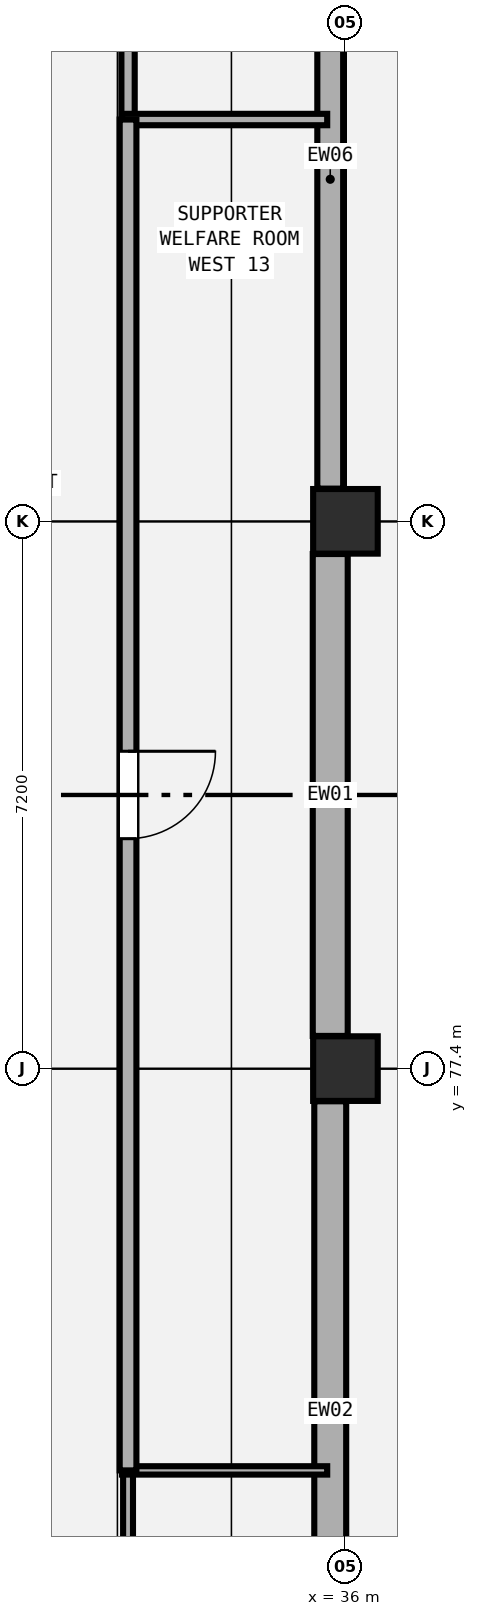
"""IFC4 building model, lengths in metres.
Left out: names, types, materials, properties, quantities, classifications, styles, units other than length and angle.
Written with IfcOpenShell. Run it as: python <this file> out.ifc"""

import sys

from ifc_helpers import new_model, si_unit, direction, frame, frame_2d, origin, origin_2d, place, context, subcontext, project, spatial, rectangle, extrude, element, fill, save


model = new_model("IFC4")
c1 = context("Model", 3, precision=1e-05, world=origin(), true_north=direction((0.0, 1.0)))
c2 = subcontext(c1, "Body", "Model", "MODEL_VIEW")
j1 = project(units=[si_unit("LENGTHUNIT", "METRE"), si_unit("PLANEANGLEUNIT", "RADIAN")], contexts=[c1])
p1 = place(None, origin())
s1 = spatial("IfcSite", under=j1, at=p1, CompositionType="ELEMENT")
p2 = place(p1, origin())
s2 = spatial("IfcBuilding", under=s1, at=p2, CompositionType="ELEMENT")
p3 = place(p2, frame((0.0, 0.0, 19.2)))
s3 = spatial("IfcBuildingStorey", under=s2, at=p3, CompositionType="ELEMENT", Elevation=19.2)
for number, where, z_axis, x_axis in (
    (1, (36.0, 77.4, 0.0), (0.0, 0.0, 1.0), (1.0, 0.0, 0.0)),
    (2, (36.0, 84.6, 0.0), (0.0, 0.0, 1.0), (1.0, 0.0, 0.0)),
):
    element("IfcColumn", number, at=place(p3, frame(where, z_axis=z_axis, x_axis=x_axis)), inside=s3, PredefinedType="COLUMN", context=c2, shape_type="SweptSolid", body=[
        extrude(rectangle(XDim=0.85, YDim=0.85, at=origin_2d()), origin(), (0.0, 0.0, 1.0), 4.8),
    ])
p4 = place(p3, frame((35.8, 93.17, 0.0), z_axis=(0.0, 0.0, 1.0), x_axis=(0.0, -1.0, 0.0)))
e3 = element("IfcWall", 3, at=p4, inside=s3, PredefinedType="SOLIDWALL", context=c2, shape_type="SweptSolid", body=[
    extrude(rectangle(XDim=8.14, YDim=0.34, at=frame_2d((4.07, 0.0))), origin(), (0.0, 0.0, 1.0), 3.28),
])
p5 = place(p3, frame((35.8, 84.17, 0.0), z_axis=(0.0, 0.0, 1.0), x_axis=(0.0, -1.0, 0.0)))
e4 = element("IfcWall", 4, at=p5, inside=s3, PredefinedType="SOLIDWALL", context=c2, shape_type="SweptSolid", body=[
    extrude(rectangle(XDim=6.34, YDim=0.46, at=frame_2d((3.17, 0.0))), origin(), (0.0, 0.0, 1.0), 3.28),
])
p6 = place(p3, frame((35.8, 76.97, 0.0), z_axis=(0.0, 0.0, 1.0), x_axis=(0.0, -1.0, 0.0)))
e5 = element("IfcWall", 5, at=p6, inside=s3, PredefinedType="SOLIDWALL", context=c2, shape_type="SweptSolid", body=[
    extrude(rectangle(XDim=8.14, YDim=0.42, at=frame_2d((4.07, 0.0))), origin(), (0.0, 0.0, 1.0), 3.28),
])
p7 = place(p3, frame((33.14, 107.658, 0.0), z_axis=(0.0, 0.0, 1.0), x_axis=(0.0, -1.0, 0.0)))
e6 = element("IfcWall", 6, at=p7, inside=s3, PredefinedType="PARTITIONING", context=c2, shape_type="SweptSolid", body=[
    extrude(rectangle(XDim=17.772, YDim=0.175, at=frame_2d((8.886, 0.0))), origin(), (0.0, 0.0, 1.0), 3.28),
])
p8 = place(p7, frame((4.118, 0.0, 0.0)))
e7 = element("IfcOpeningElement", 7, at=p8, cuts=e6, PredefinedType="OPENING", context=c2, shape_type="SweptSolid", body=[
    extrude(rectangle(XDim=1.12, YDim=2.22, at=frame_2d((0.56, 1.11))), frame((0.0, 0.097, 0.0), z_axis=(0.0, -1.0, 0.0), x_axis=(1.0, 0.0, 0.0)), (0.0, 0.0, 1.0), 0.195),
])
p9 = place(p3, frame((35.76, 89.886, 0.0), z_axis=(0.0, 0.0, 1.0), x_axis=(-1.0, 0.0, 0.0)))
e8 = element("IfcWall", 8, at=p9, inside=s3, PredefinedType="PARTITIONING", context=c2, shape_type="SweptSolid", body=[
    extrude(rectangle(XDim=2.7, YDim=0.15, at=frame_2d((1.35, 0.0))), origin(), (0.0, 0.0, 1.0), 3.28),
])
p10 = place(p3, frame((33.14, 72.114, 0.0), z_axis=(0.0, 0.0, 1.0), x_axis=(0.0, -1.0, 0.0)))
e9 = element("IfcWall", 9, at=p10, inside=s3, PredefinedType="PARTITIONING", context=c2, shape_type="SweptSolid", body=[
    extrude(rectangle(XDim=17.772, YDim=0.13, at=frame_2d((8.886, 0.0))), origin(), (0.0, 0.0, 1.0), 3.28),
])
p11 = place(p10, frame((12.469, 0.0, 0.0)))
e10 = element("IfcOpeningElement", 10, at=p11, cuts=e9, PredefinedType="OPENING", context=c2, shape_type="SweptSolid", body=[
    extrude(rectangle(XDim=1.25, YDim=2.15, at=frame_2d((0.625, 1.075))), frame((0.0, 0.075, 0.0), z_axis=(0.0, -1.0, 0.0), x_axis=(1.0, 0.0, 0.0)), (0.0, 0.0, 1.0), 0.15),
])
p12 = place(p3, frame((33.06, 72.114, 0.0), z_axis=(0.0, 0.0, 1.0), x_axis=(1.0, 0.0, 0.0)))
e11 = element("IfcWall", 11, at=p12, inside=s3, PredefinedType="PARTITIONING", context=c2, shape_type="SweptSolid", body=[
    extrude(rectangle(XDim=2.7, YDim=0.11, at=frame_2d((1.35, 0.0))), origin(), (0.0, 0.0, 1.0), 3.28),
])
p13 = place(p3, frame((33.14, 89.886, 0.0), z_axis=(0.0, 0.0, 1.0), x_axis=(0.0, -1.0, 0.0)))
e12 = element("IfcWall", 12, at=p13, inside=s3, PredefinedType="PARTITIONING", context=c2, shape_type="SweptSolid", body=[
    extrude(rectangle(XDim=17.772, YDim=0.22, at=frame_2d((8.886, 0.0))), origin(), (0.0, 0.0, 1.0), 3.28),
])
p14 = place(p13, frame((8.311, 0.0, 0.0)))
e13 = element("IfcOpeningElement", 13, at=p14, cuts=e12, PredefinedType="OPENING", context=c2, shape_type="SweptSolid", body=[
    extrude(rectangle(XDim=1.15, YDim=2.15, at=frame_2d((0.575, 1.075))), frame((0.0, 0.12, 0.0), z_axis=(0.0, -1.0, 0.0), x_axis=(1.0, 0.0, 0.0)), (0.0, 0.0, 1.0), 0.24),
])
p15 = place(p14, origin())
e14 = element("IfcDoor", 14, at=p15, inside=s3, OperationType="SINGLE_SWING_LEFT", PredefinedType="DOOR", context=c2, shape_type="SweptSolid", body=[
    extrude(rectangle(XDim=1.15, YDim=2.15, at=frame_2d((0.575, 1.075))), frame((0.0, 0.025, 0.0), z_axis=(0.0, -1.0, 0.0), x_axis=(1.0, 0.0, 0.0)), (0.0, 0.0, 1.0), 0.05),
])
fill(e13, e14)
save(model, sys.argv[1])
